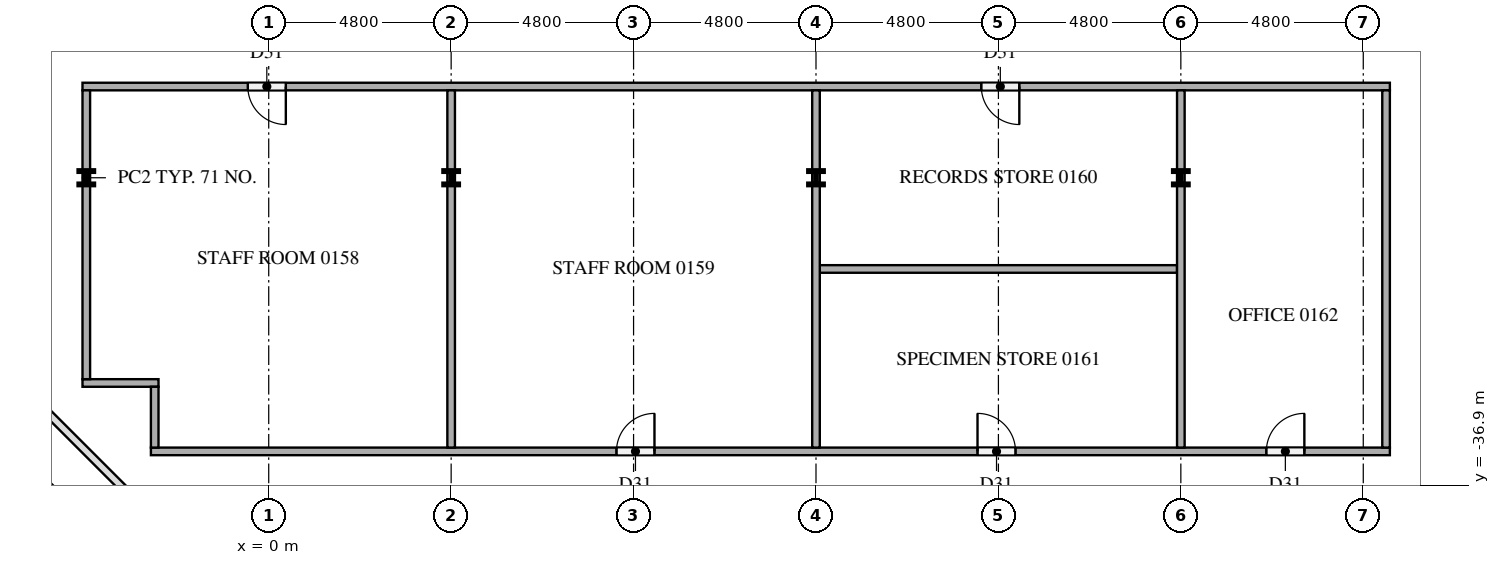
"""IFC4 building model, lengths in metres.
Left out: names, types, materials, properties, quantities, classifications, styles, units other than length and angle.
Written with IfcOpenShell. Run it as: python <this file> out.ifc"""

import sys

from ifc_helpers import new_model, si_unit, direction, frame, frame_2d, origin, origin_2d, place, context, subcontext, project, spatial, rectangle, i_section, extrude, element, fill, save


model = new_model("IFC4")
c1 = context("Model", 3, precision=1e-05, world=origin(), true_north=direction((0.0, 1.0)))
c2 = subcontext(c1, "Body", "Model", "MODEL_VIEW")
j1 = project(units=[si_unit("LENGTHUNIT", "METRE"), si_unit("PLANEANGLEUNIT", "RADIAN")], contexts=[c1])
p1 = place(None, origin())
s1 = spatial("IfcSite", under=j1, at=p1, CompositionType="ELEMENT")
p2 = place(p1, origin())
s2 = spatial("IfcBuilding", under=s1, at=p2, CompositionType="ELEMENT")
p3 = place(p2, frame((0.0, 0.0, 6.0)))
s3 = spatial("IfcBuildingStorey", under=s2, at=p3, CompositionType="ELEMENT", Elevation=6.0)
for number, where, z_axis, x_axis in (
    (1, (-4.8, -28.8, 0.0), (0.0, 0.0, 1.0), (1.0, 0.0, 0.0)),
    (2, (4.8, -28.8, 0.0), (0.0, 0.0, 1.0), (1.0, 0.0, 0.0)),
    (3, (14.4, -28.8, 0.0), (0.0, 0.0, 1.0), (1.0, 0.0, 0.0)),
    (4, (24.0, -28.8, 0.0), (0.0, 0.0, 1.0), (1.0, 0.0, 0.0)),
):
    element("IfcColumn", number, at=place(p3, frame(where, z_axis=z_axis, x_axis=x_axis)), inside=s3, PredefinedType="COLUMN", context=c2, shape_type="SweptSolid", body=[
        extrude(i_section(OverallWidth=0.396, OverallDepth=0.381, WebThickness=0.019, FlangeThickness=0.03, at=origin_2d()), origin(), (0.0, 0.0, 1.0), 4.2),
    ])
p4 = place(p3, frame((-3.1, -36.0, 0.0), z_axis=(0.0, 0.0, 1.0), x_axis=(1.0, 0.0, 0.0)))
e5 = element("IfcWall", 5, at=p4, inside=s3, PredefinedType="PARTITIONING", context=c2, shape_type="SweptSolid", body=[
    extrude(rectangle(XDim=32.6, YDim=0.2, at=frame_2d((16.3, 0.0))), origin(), (0.0, 0.0, 1.0), 4.2),
])
p5 = place(p4, frame((12.25, 0.0, 0.0)))
e6 = element("IfcOpeningElement", 6, at=p5, cuts=e5, PredefinedType="OPENING", context=c2, shape_type="SweptSolid", body=[
    extrude(rectangle(XDim=1.0, YDim=2.1, at=frame_2d((0.5, 1.05))), frame((0.0, 0.11, 0.0), z_axis=(0.0, -1.0, 0.0), x_axis=(1.0, 0.0, 0.0)), (0.0, 0.0, 1.0), 0.22),
])
p6 = place(p4, frame((21.75, 0.0, 0.0)))
e7 = element("IfcOpeningElement", 7, at=p6, cuts=e5, PredefinedType="OPENING", context=c2, shape_type="SweptSolid", body=[
    extrude(rectangle(XDim=1.0, YDim=2.1, at=frame_2d((0.5, 1.05))), frame((0.0, 0.11, 0.0), z_axis=(0.0, -1.0, 0.0), x_axis=(1.0, 0.0, 0.0)), (0.0, 0.0, 1.0), 0.22),
])
p7 = place(p4, frame((29.35, 0.0, 0.0)))
e8 = element("IfcOpeningElement", 8, at=p7, cuts=e5, PredefinedType="OPENING", context=c2, shape_type="SweptSolid", body=[
    extrude(rectangle(XDim=1.0, YDim=2.1, at=frame_2d((0.5, 1.05))), frame((0.0, 0.11, 0.0), z_axis=(0.0, -1.0, 0.0), x_axis=(1.0, 0.0, 0.0)), (0.0, 0.0, 1.0), 0.22),
])
p8 = place(p3, frame((-4.9, -34.2, 0.0), z_axis=(0.0, 0.0, 1.0), x_axis=(1.0, 0.0, 0.0)))
e9 = element("IfcWall", 9, at=p8, inside=s3, PredefinedType="PARTITIONING", context=c2, shape_type="SweptSolid", body=[
    extrude(rectangle(XDim=2.0, YDim=0.2, at=frame_2d((1.0, 0.0))), origin(), (0.0, 0.0, 1.0), 4.2),
])
p9 = place(p3, frame((14.5, -31.2, 0.0), z_axis=(0.0, 0.0, 1.0), x_axis=(1.0, 0.0, 0.0)))
e10 = element("IfcWall", 10, at=p9, inside=s3, PredefinedType="PARTITIONING", context=c2, shape_type="SweptSolid", body=[
    extrude(rectangle(XDim=9.4, YDim=0.2, at=frame_2d((4.7, 0.0))), origin(), (0.0, 0.0, 1.0), 4.2),
])
p10 = place(p3, frame((29.5, -26.4, 0.0), z_axis=(0.0, 0.0, 1.0), x_axis=(-1.0, 0.0, 0.0)))
e11 = element("IfcWall", 11, at=p10, inside=s3, PredefinedType="PARTITIONING", context=c2, shape_type="SweptSolid", body=[
    extrude(rectangle(XDim=34.4, YDim=0.2, at=frame_2d((17.2, 0.0))), origin(), (0.0, 0.0, 1.0), 4.2),
])
p11 = place(p10, frame((29.05, 0.0, 0.0)))
e12 = element("IfcOpeningElement", 12, at=p11, cuts=e11, PredefinedType="OPENING", context=c2, shape_type="SweptSolid", body=[
    extrude(rectangle(XDim=1.0, YDim=2.1, at=frame_2d((0.5, 1.05))), frame((0.0, 0.11, 0.0), z_axis=(0.0, -1.0, 0.0), x_axis=(1.0, 0.0, 0.0)), (0.0, 0.0, 1.0), 0.22),
])
p12 = place(p10, frame((9.75, 0.0, 0.0)))
e13 = element("IfcOpeningElement", 13, at=p12, cuts=e11, PredefinedType="OPENING", context=c2, shape_type="SweptSolid", body=[
    extrude(rectangle(XDim=1.0, YDim=2.1, at=frame_2d((0.5, 1.05))), frame((0.0, 0.11, 0.0), z_axis=(0.0, -1.0, 0.0), x_axis=(1.0, 0.0, 0.0)), (0.0, 0.0, 1.0), 0.22),
])
p13 = place(p3, frame((-4.8, -34.1, 0.0), z_axis=(0.0, 0.0, 1.0), x_axis=(0.0, 1.0, 0.0)))
e14 = element("IfcWall", 14, at=p13, inside=s3, PredefinedType="PARTITIONING", context=c2, shape_type="SweptSolid", body=[
    extrude(rectangle(XDim=7.6, YDim=0.2, at=frame_2d((3.8, 0.0))), origin(), (0.0, 0.0, 1.0), 4.2),
])
p14 = place(p3, frame((-3.0, -35.9, 0.0), z_axis=(0.0, 0.0, 1.0), x_axis=(0.0, 1.0, 0.0)))
e15 = element("IfcWall", 15, at=p14, inside=s3, PredefinedType="PARTITIONING", context=c2, shape_type="SweptSolid", body=[
    extrude(rectangle(XDim=1.6, YDim=0.2, at=frame_2d((0.8, 0.0))), origin(), (0.0, 0.0, 1.0), 4.2),
])
for number, where, z_axis, x_axis in (
    (16, (4.8, -35.9, 0.0), (0.0, 0.0, 1.0), (0.0, 1.0, 0.0)),
    (17, (14.4, -35.9, 0.0), (0.0, 0.0, 1.0), (0.0, 1.0, 0.0)),
    (18, (24.0, -35.9, 0.0), (0.0, 0.0, 1.0), (0.0, 1.0, 0.0)),
    (19, (29.4, -35.9, 0.0), (0.0, 0.0, 1.0), (0.0, 1.0, 0.0)),
):
    element("IfcWall", number, at=place(p3, frame(where, z_axis=z_axis, x_axis=x_axis)), inside=s3, PredefinedType="PARTITIONING", context=c2, shape_type="SweptSolid", body=[
        extrude(rectangle(XDim=9.4, YDim=0.2, at=frame_2d((4.7, 0.0))), origin(), (0.0, 0.0, 1.0), 4.2),
    ])
p15 = place(p11, origin())
e20 = element("IfcDoor", 20, at=p15, inside=s3, OperationType="SINGLE_SWING_LEFT", PredefinedType="DOOR", context=c2, shape_type="SweptSolid", body=[
    extrude(rectangle(XDim=1.0, YDim=2.1, at=frame_2d((0.5, 1.05))), frame((0.0, 0.025, 0.0), z_axis=(0.0, -1.0, 0.0), x_axis=(1.0, 0.0, 0.0)), (0.0, 0.0, 1.0), 0.05),
])
fill(e12, e20)
p16 = place(p5, origin())
e21 = element("IfcDoor", 21, at=p16, inside=s3, OperationType="SINGLE_SWING_RIGHT", PredefinedType="DOOR", context=c2, shape_type="SweptSolid", body=[
    extrude(rectangle(XDim=1.0, YDim=2.1, at=frame_2d((0.5, 1.05))), frame((0.0, 0.025, 0.0), z_axis=(0.0, -1.0, 0.0), x_axis=(1.0, 0.0, 0.0)), (0.0, 0.0, 1.0), 0.05),
])
fill(e6, e21)
p17 = place(p12, origin())
e22 = element("IfcDoor", 22, at=p17, inside=s3, OperationType="SINGLE_SWING_LEFT", PredefinedType="DOOR", context=c2, shape_type="SweptSolid", body=[
    extrude(rectangle(XDim=1.0, YDim=2.1, at=frame_2d((0.5, 1.05))), frame((0.0, 0.025, 0.0), z_axis=(0.0, -1.0, 0.0), x_axis=(1.0, 0.0, 0.0)), (0.0, 0.0, 1.0), 0.05),
])
fill(e13, e22)
p18 = place(p6, origin())
e23 = element("IfcDoor", 23, at=p18, inside=s3, OperationType="SINGLE_SWING_LEFT", PredefinedType="DOOR", context=c2, shape_type="SweptSolid", body=[
    extrude(rectangle(XDim=1.0, YDim=2.1, at=frame_2d((0.5, 1.05))), frame((0.0, 0.025, 0.0), z_axis=(0.0, -1.0, 0.0), x_axis=(1.0, 0.0, 0.0)), (0.0, 0.0, 1.0), 0.05),
])
fill(e7, e23)
p19 = place(p7, origin())
e24 = element("IfcDoor", 24, at=p19, inside=s3, OperationType="SINGLE_SWING_RIGHT", PredefinedType="DOOR", context=c2, shape_type="SweptSolid", body=[
    extrude(rectangle(XDim=1.0, YDim=2.1, at=frame_2d((0.5, 1.05))), frame((0.0, 0.025, 0.0), z_axis=(0.0, -1.0, 0.0), x_axis=(1.0, 0.0, 0.0)), (0.0, 0.0, 1.0), 0.05),
])
fill(e8, e24)
save(model, sys.argv[1])
